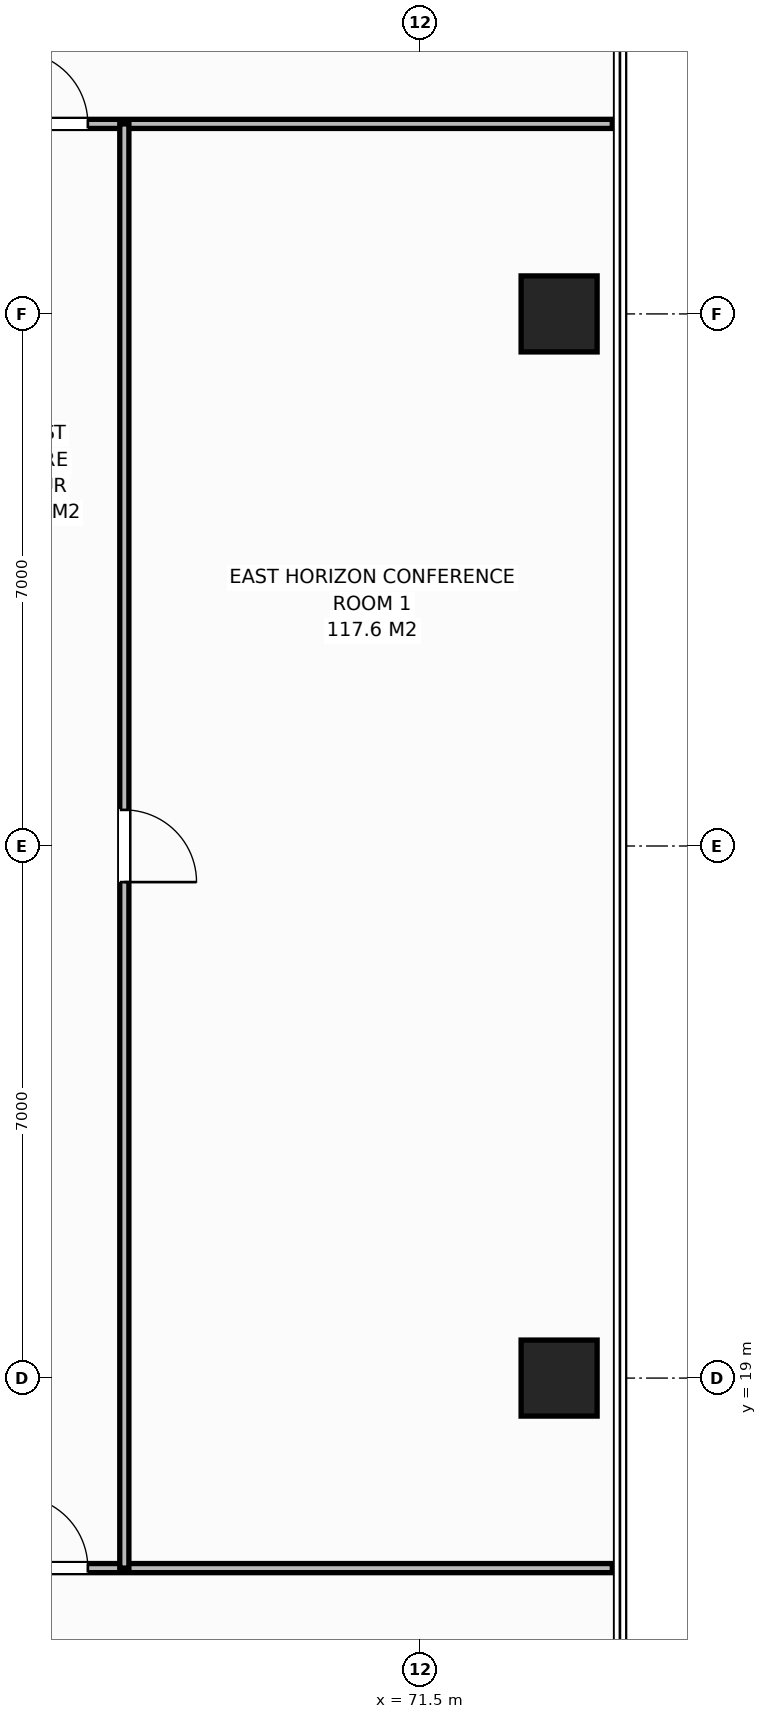
"""IFC4 building model, lengths in metres.
Left out: names, types, materials, properties, quantities, classifications, styles, units other than length and angle.
Written with IfcOpenShell. Run it as: python <this file> out.ifc"""

import sys

from ifc_helpers import new_model, si_unit, direction, frame, frame_2d, origin, origin_2d, place, context, subcontext, project, spatial, rectangle, extrude, element, fill, save


model = new_model("IFC4")
c1 = context("Model", 3, precision=1e-05, world=origin(), true_north=direction((0.0, 1.0)))
c2 = subcontext(c1, "Body", "Model", "MODEL_VIEW")
j1 = project(units=[si_unit("LENGTHUNIT", "METRE"), si_unit("PLANEANGLEUNIT", "RADIAN")], contexts=[c1])
p1 = place(None, origin())
s1 = spatial("IfcSite", under=j1, at=p1, CompositionType="ELEMENT")
p2 = place(p1, origin())
s2 = spatial("IfcBuilding", under=s1, at=p2, CompositionType="ELEMENT")
p3 = place(p2, frame((0.0, 0.0, 178.4)))
s3 = spatial("IfcBuildingStorey", under=s2, at=p3, CompositionType="ELEMENT", Elevation=178.4)
for number, where, z_axis, x_axis in (
    (1, (73.32, 19.0, 0.0), (0.0, 0.0, 1.0), (1.0, 0.0, 0.0)),
    (2, (73.32, 33.0, 0.0), (0.0, 0.0, 1.0), (1.0, 0.0, 0.0)),
):
    element("IfcColumn", number, at=place(p3, frame(where, z_axis=z_axis, x_axis=x_axis)), inside=s3, PredefinedType="COLUMN", context=c2, shape_type="SweptSolid", body=[
        extrude(rectangle(XDim=1.0, YDim=1.0, at=origin_2d()), origin(), (0.0, 0.0, 1.0), 3.8),
    ])
p4 = place(p3, frame((63.903, 35.5, 0.0), z_axis=(0.0, 0.0, 1.0), x_axis=(1.0, 0.0, 0.0)))
e3 = element("IfcWall", 3, at=p4, inside=s3, PredefinedType="PARTITIONING", context=c2, shape_type="SweptSolid", body=[
    extrude(rectangle(XDim=10.117, YDim=0.12, at=frame_2d((5.058, 0.0))), origin(), (0.0, 0.0, 1.0), 3.572),
])
p5 = place(p4, frame((2.267, 0.0, 0.0)))
e4 = element("IfcOpeningElement", 4, at=p5, cuts=e3, PredefinedType="OPENING", context=c2, shape_type="SweptSolid", body=[
    extrude(rectangle(XDim=0.95, YDim=2.15, at=frame_2d((0.475, 1.075))), frame((0.0, 0.07, 0.0), z_axis=(0.0, -1.0, 0.0), x_axis=(1.0, 0.0, 0.0)), (0.0, 0.0, 1.0), 0.14),
])
p6 = place(p3, frame((64.86, 16.5, 0.0), z_axis=(0.0, 0.0, 1.0), x_axis=(1.0, 0.0, 0.0)))
e5 = element("IfcWall", 5, at=p6, inside=s3, PredefinedType="PARTITIONING", context=c2, shape_type="SweptSolid", body=[
    extrude(rectangle(XDim=9.16, YDim=0.12, at=frame_2d((4.58, 0.0))), origin(), (0.0, 0.0, 1.0), 3.572),
])
p7 = place(p6, frame((1.31, 0.0, 0.0)))
e6 = element("IfcOpeningElement", 6, at=p7, cuts=e5, PredefinedType="OPENING", context=c2, shape_type="SweptSolid", body=[
    extrude(rectangle(XDim=0.95, YDim=2.15, at=frame_2d((0.475, 1.075))), frame((0.0, 0.07, 0.0), z_axis=(0.0, -1.0, 0.0), x_axis=(1.0, 0.0, 0.0)), (0.0, 0.0, 1.0), 0.14),
])
p8 = place(p3, frame((67.6, 16.5, 0.0), z_axis=(0.0, 0.0, 1.0), x_axis=(0.0, 1.0, 0.0)))
e7 = element("IfcWall", 7, at=p8, inside=s3, PredefinedType="PARTITIONING", context=c2, shape_type="SweptSolid", body=[
    extrude(rectangle(XDim=19.0, YDim=0.12, at=frame_2d((9.5, 0.0))), origin(), (0.0, 0.0, 1.0), 3.572),
])
p9 = place(p8, frame((9.025, 0.0, 0.0)))
e8 = element("IfcOpeningElement", 8, at=p9, cuts=e7, PredefinedType="OPENING", context=c2, shape_type="SweptSolid", body=[
    extrude(rectangle(XDim=0.95, YDim=2.15, at=frame_2d((0.475, 1.075))), frame((0.0, 0.07, 0.0), z_axis=(0.0, -1.0, 0.0), x_axis=(1.0, 0.0, 0.0)), (0.0, 0.0, 1.0), 0.14),
])
p10 = place(p5, origin())
e9 = element("IfcDoor", 9, at=p10, inside=s3, OperationType="SINGLE_SWING_LEFT", PredefinedType="DOOR", context=c2, shape_type="SweptSolid", body=[
    extrude(rectangle(XDim=0.95, YDim=2.15, at=frame_2d((0.475, 1.075))), frame((0.0, 0.025, 0.0), z_axis=(0.0, -1.0, 0.0), x_axis=(1.0, 0.0, 0.0)), (0.0, 0.0, 1.0), 0.05),
])
fill(e4, e9)
p11 = place(p7, origin())
e10 = element("IfcDoor", 10, at=p11, inside=s3, OperationType="SINGLE_SWING_LEFT", PredefinedType="DOOR", context=c2, shape_type="SweptSolid", body=[
    extrude(rectangle(XDim=0.95, YDim=2.15, at=frame_2d((0.475, 1.075))), frame((0.0, 0.025, 0.0), z_axis=(0.0, -1.0, 0.0), x_axis=(1.0, 0.0, 0.0)), (0.0, 0.0, 1.0), 0.05),
])
fill(e6, e10)
p12 = place(p9, origin())
e11 = element("IfcDoor", 11, at=p12, inside=s3, OperationType="SINGLE_SWING_RIGHT", PredefinedType="DOOR", context=c2, shape_type="SweptSolid", body=[
    extrude(rectangle(XDim=0.95, YDim=2.15, at=frame_2d((0.475, 1.075))), frame((0.0, 0.025, 0.0), z_axis=(0.0, -1.0, 0.0), x_axis=(1.0, 0.0, 0.0)), (0.0, 0.0, 1.0), 0.05),
])
fill(e8, e11)
save(model, sys.argv[1])
